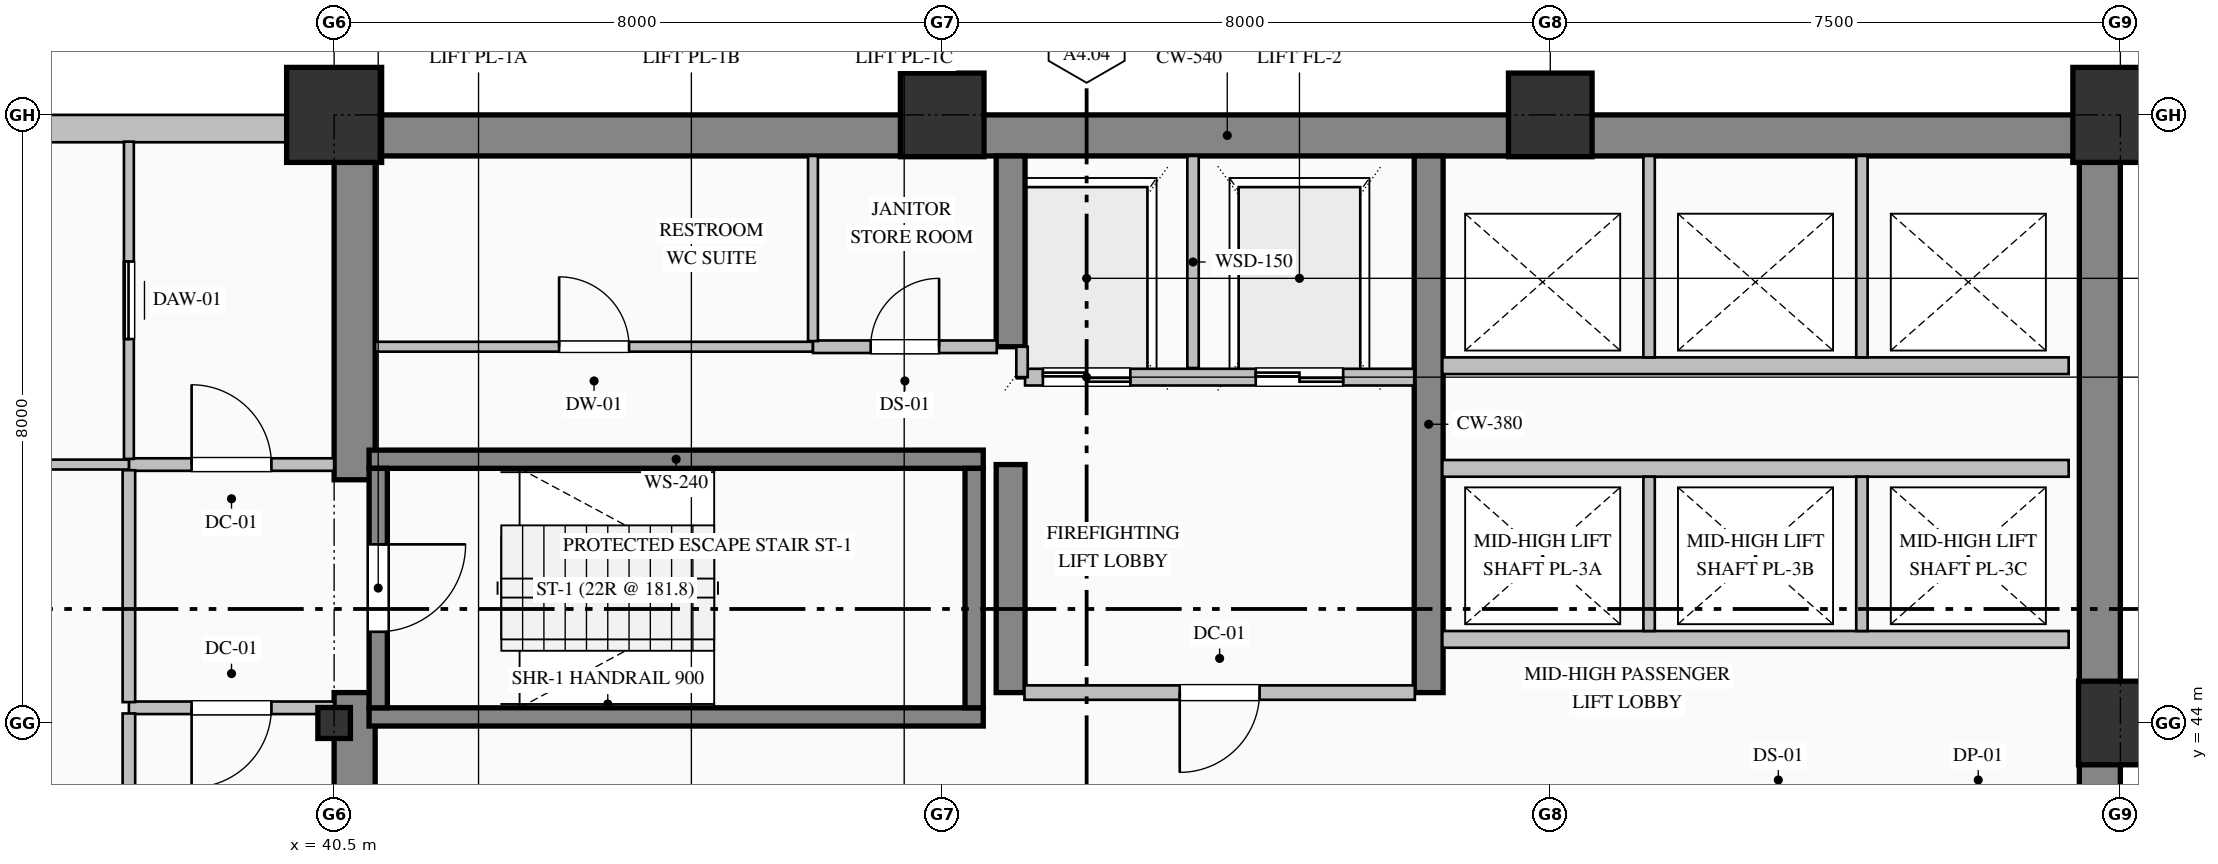
"""IFC4 building model, lengths in metres.
Left out: names, types, materials, properties, quantities, classifications, styles, units other than length and angle.
Written with IfcOpenShell. Run it as: python <this file> out.ifc"""

import sys

from ifc_helpers import new_model, si_unit, direction, frame, frame_2d, origin, origin_2d, place, context, subcontext, project, spatial, rectangle, hollow_rectangle, i_section, extrude, element, fill, save


model = new_model("IFC4")
c1 = context("Model", 3, precision=1e-05, world=origin(), true_north=direction((0.0, 1.0)))
c2 = subcontext(c1, "Body", "Model", "MODEL_VIEW")
j1 = project(units=[si_unit("LENGTHUNIT", "METRE"), si_unit("PLANEANGLEUNIT", "RADIAN")], contexts=[c1])
p1 = place(None, origin())
s1 = spatial("IfcSite", under=j1, at=p1, CompositionType="ELEMENT")
p2 = place(p1, origin())
s2 = spatial("IfcBuilding", under=s1, at=p2, CompositionType="ELEMENT")
p3 = place(p2, frame((0.0, 0.0, 76.2)))
s3 = spatial("IfcBuildingStorey", under=s2, at=p3, CompositionType="ELEMENT", Elevation=76.2)
p4 = place(p3, frame((40.5, 51.73, 0.0), z_axis=(0.0, 0.0, 1.0), x_axis=(1.0, 0.0, 0.0)))
e1 = element("IfcWall", 1, at=p4, inside=s3, PredefinedType="SHEAR", context=c2, shape_type="SweptSolid", body=[
    extrude(rectangle(XDim=23.5, YDim=0.54, at=frame_2d((11.75, 0.0))), origin(), (0.0, 0.0, 1.0), 3.75),
])
p5 = place(p3, frame((63.73, 36.32, 0.0), z_axis=(0.0, 0.0, 1.0), x_axis=(0.0, 1.0, 0.0)))
e2 = element("IfcWall", 2, at=p5, inside=s3, PredefinedType="SHEAR", context=c2, shape_type="SweptSolid", body=[
    extrude(rectangle(XDim=15.14, YDim=0.54, at=frame_2d((7.57, 0.0))), origin(), (0.0, 0.0, 1.0), 3.75),
])
p6 = place(p3, frame((40.77, 36.54, 0.0), z_axis=(0.0, 0.0, 1.0), x_axis=(0.0, 1.0, 0.0)))
e3 = element("IfcWall", 3, at=p6, inside=s3, PredefinedType="SHEAR", context=c2, shape_type="SweptSolid", body=[
    extrude(rectangle(XDim=7.86, YDim=0.54, at=frame_2d((3.93, 0.0))), origin(), (0.0, 0.0, 1.0), 3.75),
])
p7 = place(p3, frame((40.77, 47.2, 0.0), z_axis=(0.0, 0.0, 1.0), x_axis=(0.0, 1.0, 0.0)))
e4 = element("IfcWall", 4, at=p7, inside=s3, PredefinedType="SHEAR", context=c2, shape_type="SweptSolid", body=[
    extrude(rectangle(XDim=4.26, YDim=0.54, at=frame_2d((2.13, 0.0))), origin(), (0.0, 0.0, 1.0), 3.75),
])
p8 = place(p3, frame((49.4, 44.4, 0.0), z_axis=(0.0, 0.0, 1.0), x_axis=(0.0, 1.0, 0.0)))
e5 = element("IfcWall", 5, at=p8, inside=s3, PredefinedType="SHEAR", context=c2, shape_type="SweptSolid", body=[
    extrude(rectangle(XDim=3.0, YDim=0.38, at=frame_2d((1.5, 0.0))), origin(), (0.0, 0.0, 1.0), 3.75),
])
p9 = place(p3, frame((49.4, 48.95, 0.0), z_axis=(0.0, 0.0, 1.0), x_axis=(0.0, 1.0, 0.0)))
e6 = element("IfcWall", 6, at=p9, inside=s3, PredefinedType="SHEAR", context=c2, shape_type="SweptSolid", body=[
    extrude(rectangle(XDim=2.51, YDim=0.38, at=frame_2d((1.255, 0.0))), origin(), (0.0, 0.0, 1.0), 3.75),
])
p10 = place(p3, frame((54.9, 44.4, 0.0), z_axis=(0.0, 0.0, 1.0), x_axis=(0.0, 1.0, 0.0)))
e7 = element("IfcWall", 7, at=p10, inside=s3, PredefinedType="SHEAR", context=c2, shape_type="SweptSolid", body=[
    extrude(rectangle(XDim=7.06, YDim=0.38, at=frame_2d((3.53, 0.0))), origin(), (0.0, 0.0, 1.0), 3.75),
])
p11 = place(p3, frame((40.5, 44.0, 0.0), z_axis=(0.0, 0.0, 1.0), x_axis=(1.0, 0.0, 0.0)))
e8 = element("IfcColumn", 8, at=p11, inside=s3, PredefinedType="COLUMN", context=c2, shape_type="SweptSolid", body=[
    extrude(i_section(OverallWidth=0.407, OverallDepth=0.428, WebThickness=0.02, FlangeThickness=0.035, FilletRadius=0.022, at=origin_2d()), origin(), (0.0, 0.0, 1.0), 4.0),
])
p12 = place(p3, frame((40.5, 52.0, 0.0), z_axis=(0.0, 0.0, 1.0), x_axis=(1.0, 0.0, 0.0)))
e9 = element("IfcColumn", 9, at=p12, inside=s3, PredefinedType="COLUMN", context=c2, shape_type="SweptSolid", body=[
    extrude(hollow_rectangle(XDim=1.25, YDim=1.25, WallThickness=0.045, at=origin_2d()), origin(), (0.0, 0.0, 1.0), 4.0),
])
for number, where, z_axis, x_axis in (
    (10, (48.5, 52.0, 0.0), (0.0, 0.0, 1.0), (1.0, 0.0, 0.0)),
    (11, (56.5, 52.0, 0.0), (0.0, 0.0, 1.0), (1.0, 0.0, 0.0)),
    (12, (64.0, 44.0, 0.0), (0.0, 0.0, 1.0), (1.0, 0.0, 0.0)),
):
    element("IfcColumn", number, at=place(p3, frame(where, z_axis=z_axis, x_axis=x_axis)), inside=s3, PredefinedType="COLUMN", context=c2, shape_type="SweptSolid", body=[
        extrude(hollow_rectangle(XDim=1.1, YDim=1.1, WallThickness=0.04, at=origin_2d()), origin(), (0.0, 0.0, 1.0), 4.0),
    ])
p13 = place(p3, frame((64.0, 52.0, 0.0), z_axis=(0.0, 0.0, 1.0), x_axis=(1.0, 0.0, 0.0)))
e13 = element("IfcColumn", 13, at=p13, inside=s3, PredefinedType="COLUMN", context=c2, shape_type="SweptSolid", body=[
    extrude(hollow_rectangle(XDim=1.25, YDim=1.25, WallThickness=0.045, at=origin_2d()), origin(), (0.0, 0.0, 1.0), 4.0),
])
p14 = place(p3, frame((4.0, 51.82, 0.0), z_axis=(0.0, 0.0, 1.0), x_axis=(1.0, 0.0, 0.0)))
e14 = element("IfcWall", 14, at=p14, inside=s3, PredefinedType="SOLIDWALL", context=c2, shape_type="SweptSolid", body=[
    extrude(rectangle(XDim=36.52, YDim=0.36, at=frame_2d((18.26, 0.0))), origin(), (0.0, 0.0, 1.0), 3.25),
])
p15 = place(p14, frame((6.3, 0.0, 0.85)))
e15 = element("IfcOpeningElement", 15, at=p15, cuts=e14, PredefinedType="OPENING", context=c2, shape_type="SweptSolid", body=[
    extrude(rectangle(XDim=1.8, YDim=2.05, at=frame_2d((0.9, 1.025))), frame((0.0, 0.19, 0.0), z_axis=(0.0, -1.0, 0.0), x_axis=(1.0, 0.0, 0.0)), (0.0, 0.0, 1.0), 0.38),
])
p16 = place(p14, frame((17.1, 0.0, 0.85)))
e16 = element("IfcOpeningElement", 16, at=p16, cuts=e14, PredefinedType="OPENING", context=c2, shape_type="SweptSolid", body=[
    extrude(rectangle(XDim=1.8, YDim=2.05, at=frame_2d((0.9, 1.025))), frame((0.0, 0.19, 0.0), z_axis=(0.0, -1.0, 0.0), x_axis=(1.0, 0.0, 0.0)), (0.0, 0.0, 1.0), 0.38),
])
p17 = place(p14, frame((24.0, 0.0, 0.8)))
e17 = element("IfcOpeningElement", 17, at=p17, cuts=e14, PredefinedType="OPENING", context=c2, shape_type="SweptSolid", body=[
    extrude(rectangle(XDim=2.4, YDim=2.15, at=frame_2d((1.2, 1.075))), frame((0.0, 0.19, 0.0), z_axis=(0.0, -1.0, 0.0), x_axis=(1.0, 0.0, 0.0)), (0.0, 0.0, 1.0), 0.38),
])
for number, where, z_axis, x_axis in (
    (18, (40.96, 47.47, 0.0), (0.0, 0.0, 1.0), (1.0, 0.0, 0.0)),
    (19, (49.04, 44.08, 0.0), (0.0, 0.0, 1.0), (-1.0, 0.0, 0.0)),
):
    element("IfcWall", number, at=place(p3, frame(where, z_axis=z_axis, x_axis=x_axis)), inside=s3, PredefinedType="SOLIDWALL", context=c2, shape_type="SweptSolid", body=[
        extrude(rectangle(XDim=8.08, YDim=0.24, at=frame_2d((4.04, 0.0))), origin(), (0.0, 0.0, 1.0), 4.0),
    ])
p18 = place(p3, frame((41.08, 47.35, 0.0), z_axis=(0.0, 0.0, 1.0), x_axis=(0.0, -1.0, 0.0)))
e20 = element("IfcWall", 20, at=p18, inside=s3, PredefinedType="SOLIDWALL", context=c2, shape_type="SweptSolid", body=[
    extrude(rectangle(XDim=3.15, YDim=0.24, at=frame_2d((1.575, 0.0))), origin(), (0.0, 0.0, 1.0), 4.0),
])
p19 = place(p18, frame((1.0, 0.0, 0.0)))
e21 = element("IfcOpeningElement", 21, at=p19, cuts=e20, PredefinedType="OPENING", context=c2, shape_type="SweptSolid", body=[
    extrude(rectangle(XDim=1.15, YDim=2.2, at=frame_2d((0.575, 1.1))), frame((0.0, 0.13, 0.0), z_axis=(0.0, -1.0, 0.0), x_axis=(1.0, 0.0, 0.0)), (0.0, 0.0, 1.0), 0.26),
])
p20 = place(p3, frame((48.92, 44.2, 0.0), z_axis=(0.0, 0.0, 1.0), x_axis=(0.0, 1.0, 0.0)))
e22 = element("IfcWall", 22, at=p20, inside=s3, PredefinedType="SOLIDWALL", context=c2, shape_type="SweptSolid", body=[
    extrude(rectangle(XDim=3.15, YDim=0.24, at=frame_2d((1.575, 0.0))), origin(), (0.0, 0.0, 1.0), 4.0),
])
p21 = place(p3, frame((54.71, 48.55, 0.0), z_axis=(0.0, 0.0, 1.0), x_axis=(-1.0, 0.0, 0.0)))
e23 = element("IfcWall", 23, at=p21, inside=s3, PredefinedType="PARTITIONING", context=c2, shape_type="SweptSolid", body=[
    extrude(rectangle(XDim=5.12, YDim=0.22, at=frame_2d((2.56, 0.0))), origin(), (0.0, 0.0, 1.0), 3.75),
])
p22 = place(p21, frame((3.735, 0.0, 0.0)))
e24 = element("IfcOpeningElement", 24, at=p22, cuts=e23, PredefinedType="OPENING", context=c2, shape_type="SweptSolid", body=[
    extrude(rectangle(XDim=1.15, YDim=2.2, at=frame_2d((0.575, 1.1))), frame((0.0, 0.12, 0.0), z_axis=(0.0, -1.0, 0.0), x_axis=(1.0, 0.0, 0.0)), (0.0, 0.0, 1.0), 0.24),
])
p23 = place(p21, frame((0.935, 0.0, 0.0)))
e25 = element("IfcOpeningElement", 25, at=p23, cuts=e23, PredefinedType="OPENING", context=c2, shape_type="SweptSolid", body=[
    extrude(rectangle(XDim=1.15, YDim=2.2, at=frame_2d((0.575, 1.1))), frame((0.0, 0.12, 0.0), z_axis=(0.0, -1.0, 0.0), x_axis=(1.0, 0.0, 0.0)), (0.0, 0.0, 1.0), 0.24),
])
p24 = place(p3, frame((51.8, 48.67, 0.0), z_axis=(0.0, 0.0, 1.0), x_axis=(0.0, 1.0, 0.0)))
e26 = element("IfcWall", 26, at=p24, inside=s3, PredefinedType="PARTITIONING", context=c2, shape_type="SweptSolid", body=[
    extrude(rectangle(XDim=2.79, YDim=0.15, at=frame_2d((1.395, 0.0))), origin(), (0.0, 0.0, 1.0), 3.75),
])
p25 = place(p3, frame((49.55, 48.55, 0.0), z_axis=(0.0, 0.0, 1.0), x_axis=(0.0, 1.0, 0.0)))
e27 = element("IfcWall", 27, at=p25, inside=s3, PredefinedType="PARTITIONING", context=c2, shape_type="SweptSolid", body=[
    extrude(rectangle(XDim=0.4, YDim=0.15, at=frame_2d((0.2, 0.0))), origin(), (0.0, 0.0, 1.0), 3.75),
])
for number, where, z_axis, x_axis in (
    (28, (63.32, 45.1, 0.0), (0.0, 0.0, 1.0), (-1.0, 0.0, 0.0)),
    (29, (55.08, 47.35, 0.0), (0.0, 0.0, 1.0), (1.0, 0.0, 0.0)),
):
    element("IfcWall", number, at=place(p3, frame(where, z_axis=z_axis, x_axis=x_axis)), inside=s3, PredefinedType="PARTITIONING", context=c2, shape_type="SweptSolid", body=[
        extrude(rectangle(XDim=8.24, YDim=0.22, at=frame_2d((4.12, 0.0))), origin(), (0.0, 0.0, 1.0), 3.75),
    ])
for number, where, z_axis, x_axis in (
    (30, (57.8, 45.21, 0.0), (0.0, 0.0, 1.0), (0.0, 1.0, 0.0)),
    (31, (60.6, 45.21, 0.0), (0.0, 0.0, 1.0), (0.0, 1.0, 0.0)),
):
    element("IfcWall", number, at=place(p3, frame(where, z_axis=z_axis, x_axis=x_axis)), inside=s3, PredefinedType="PARTITIONING", context=c2, shape_type="SweptSolid", body=[
        extrude(rectangle(XDim=2.03, YDim=0.15, at=frame_2d((1.015, 0.0))), origin(), (0.0, 0.0, 1.0), 3.75),
    ])
p26 = place(p3, frame((63.32, 48.7, 0.0), z_axis=(0.0, 0.0, 1.0), x_axis=(-1.0, 0.0, 0.0)))
e32 = element("IfcWall", 32, at=p26, inside=s3, PredefinedType="PARTITIONING", context=c2, shape_type="SweptSolid", body=[
    extrude(rectangle(XDim=8.24, YDim=0.22, at=frame_2d((4.12, 0.0))), origin(), (0.0, 0.0, 1.0), 3.75),
])
for number, where, z_axis, x_axis in (
    (33, (57.8, 48.81, 0.0), (0.0, 0.0, 1.0), (0.0, 1.0, 0.0)),
    (34, (60.6, 48.81, 0.0), (0.0, 0.0, 1.0), (0.0, 1.0, 0.0)),
):
    element("IfcWall", number, at=place(p3, frame(where, z_axis=z_axis, x_axis=x_axis)), inside=s3, PredefinedType="PARTITIONING", context=c2, shape_type="SweptSolid", body=[
        extrude(rectangle(XDim=2.65, YDim=0.15, at=frame_2d((1.325, 0.0))), origin(), (0.0, 0.0, 1.0), 3.75),
    ])
p27 = place(p3, frame((37.8, 47.4, 0.0), z_axis=(0.0, 0.0, 1.0), x_axis=(1.0, 0.0, 0.0)))
e35 = element("IfcWall", 35, at=p27, inside=s3, PredefinedType="PARTITIONING", context=c2, shape_type="SweptSolid", body=[
    extrude(rectangle(XDim=2.7, YDim=0.165, at=frame_2d((1.35, 0.0))), origin(), (0.0, 0.0, 1.0), 3.75),
])
p28 = place(p27, frame((0.825, 0.0, 0.0)))
e36 = element("IfcOpeningElement", 36, at=p28, cuts=e35, PredefinedType="OPENING", context=c2, shape_type="SweptSolid", body=[
    extrude(rectangle(XDim=1.05, YDim=2.15, at=frame_2d((0.525, 1.075))), frame((0.0, 0.093, 0.0), z_axis=(0.0, -1.0, 0.0), x_axis=(1.0, 0.0, 0.0)), (0.0, 0.0, 1.0), 0.185),
])
p29 = place(p3, frame((40.5, 44.2, 0.0), z_axis=(0.0, 0.0, 1.0), x_axis=(-1.0, 0.0, 0.0)))
e37 = element("IfcWall", 37, at=p29, inside=s3, PredefinedType="PARTITIONING", context=c2, shape_type="SweptSolid", body=[
    extrude(rectangle(XDim=2.7, YDim=0.165, at=frame_2d((1.35, 0.0))), origin(), (0.0, 0.0, 1.0), 3.75),
])
p30 = place(p29, frame((0.825, 0.0, 0.0)))
e38 = element("IfcOpeningElement", 38, at=p30, cuts=e37, PredefinedType="OPENING", context=c2, shape_type="SweptSolid", body=[
    extrude(rectangle(XDim=1.05, YDim=2.15, at=frame_2d((0.525, 1.075))), frame((0.0, 0.093, 0.0), z_axis=(0.0, -1.0, 0.0), x_axis=(1.0, 0.0, 0.0)), (0.0, 0.0, 1.0), 0.185),
])
p31 = place(p3, frame((37.8, 44.274, 0.0), z_axis=(0.0, 0.0, 1.0), x_axis=(0.0, 1.0, 0.0)))
e39 = element("IfcWall", 39, at=p31, inside=s3, PredefinedType="PARTITIONING", context=c2, shape_type="SweptSolid", body=[
    extrude(rectangle(XDim=3.051, YDim=0.165, at=frame_2d((1.525, 0.0))), origin(), (0.0, 0.0, 1.0), 3.75),
])
p32 = place(p3, frame((37.8, 47.475, 0.0), z_axis=(0.0, 0.0, 1.0), x_axis=(0.0, 1.0, 0.0)))
e40 = element("IfcWall", 40, at=p32, inside=s3, PredefinedType="PARTITIONING", context=c2, shape_type="SweptSolid", body=[
    extrude(rectangle(XDim=4.173, YDim=0.13, at=frame_2d((2.087, 0.0))), origin(), (0.0, 0.0, 1.0), 3.75),
])
p33 = place(p32, frame((1.577, 0.0, 0.0)))
e41 = element("IfcOpeningElement", 41, at=p33, cuts=e40, PredefinedType="OPENING", context=c2, shape_type="SweptSolid", body=[
    extrude(rectangle(XDim=1.02, YDim=2.15, at=frame_2d((0.51, 1.075))), frame((0.0, 0.075, 0.0), z_axis=(0.0, -1.0, 0.0), x_axis=(1.0, 0.0, 0.0)), (0.0, 0.0, 1.0), 0.15),
])
p34 = place(p3, frame((37.8, 47.4, 0.0), z_axis=(0.0, 0.0, 1.0), x_axis=(-1.0, 0.0, 0.0)))
e42 = element("IfcWall", 42, at=p34, inside=s3, PredefinedType="PARTITIONING", context=c2, shape_type="SweptSolid", body=[
    extrude(rectangle(XDim=2.4, YDim=0.13, at=frame_2d((1.2, 0.0))), origin(), (0.0, 0.0, 1.0), 3.75),
])
p35 = place(p3, frame((41.04, 48.95, 0.0), z_axis=(0.0, 0.0, 1.0), x_axis=(1.0, 0.0, 0.0)))
e43 = element("IfcWall", 43, at=p35, inside=s3, PredefinedType="PARTITIONING", context=c2, shape_type="SweptSolid", body=[
    extrude(rectangle(XDim=5.76, YDim=0.13, at=frame_2d((2.88, 0.0))), origin(), (0.0, 0.0, 1.0), 3.75),
])
p36 = place(p35, frame((2.42, 0.0, 0.0)))
e44 = element("IfcOpeningElement", 44, at=p36, cuts=e43, PredefinedType="OPENING", context=c2, shape_type="SweptSolid", body=[
    extrude(rectangle(XDim=0.92, YDim=2.15, at=frame_2d((0.46, 1.075))), frame((0.0, 0.075, 0.0), z_axis=(0.0, -1.0, 0.0), x_axis=(1.0, 0.0, 0.0)), (0.0, 0.0, 1.0), 0.15),
])
p37 = place(p3, frame((46.8, 48.95, 0.0), z_axis=(0.0, 0.0, 1.0), x_axis=(1.0, 0.0, 0.0)))
e45 = element("IfcWall", 45, at=p37, inside=s3, PredefinedType="PARTITIONING", context=c2, shape_type="SweptSolid", body=[
    extrude(rectangle(XDim=2.418, YDim=0.165, at=frame_2d((1.209, 0.0))), origin(), (0.0, 0.0, 1.0), 3.75),
])
p38 = place(p37, frame((0.759, 0.0, 0.0)))
e46 = element("IfcOpeningElement", 46, at=p38, cuts=e45, PredefinedType="OPENING", context=c2, shape_type="SweptSolid", body=[
    extrude(rectangle(XDim=0.9, YDim=2.15, at=frame_2d((0.45, 1.075))), frame((0.0, 0.093, 0.0), z_axis=(0.0, -1.0, 0.0), x_axis=(1.0, 0.0, 0.0)), (0.0, 0.0, 1.0), 0.185),
])
p39 = place(p3, frame((54.718, 44.4, 0.0), z_axis=(0.0, 0.0, 1.0), x_axis=(-1.0, 0.0, 0.0)))
e47 = element("IfcWall", 47, at=p39, inside=s3, PredefinedType="PARTITIONING", context=c2, shape_type="SweptSolid", body=[
    extrude(rectangle(XDim=5.136, YDim=0.19, at=frame_2d((2.568, 0.0))), origin(), (0.0, 0.0, 1.0), 3.75),
])
p40 = place(p39, frame((2.043, 0.0, 0.0)))
e48 = element("IfcOpeningElement", 48, at=p40, cuts=e47, PredefinedType="OPENING", context=c2, shape_type="SweptSolid", body=[
    extrude(rectangle(XDim=1.05, YDim=2.15, at=frame_2d((0.525, 1.075))), frame((0.0, 0.105, 0.0), z_axis=(0.0, -1.0, 0.0), x_axis=(1.0, 0.0, 0.0)), (0.0, 0.0, 1.0), 0.21),
])
p41 = place(p3, frame((46.8, 51.46, 0.0), z_axis=(0.0, 0.0, 1.0), x_axis=(0.0, -1.0, 0.0)))
e49 = element("IfcWall", 49, at=p41, inside=s3, PredefinedType="PARTITIONING", context=c2, shape_type="SweptSolid", body=[
    extrude(rectangle(XDim=2.436, YDim=0.13, at=frame_2d((1.218, 0.0))), origin(), (0.0, 0.0, 1.0), 3.75),
])
p42 = place(p3, frame((37.8, 40.475, 0.0), z_axis=(0.0, 0.0, 1.0), x_axis=(0.0, 1.0, 0.0)))
e50 = element("IfcWall", 50, at=p42, inside=s3, PredefinedType="PARTITIONING", context=c2, shape_type="SweptSolid", body=[
    extrude(rectangle(XDim=3.651, YDim=0.165, at=frame_2d((1.825, 0.0))), origin(), (0.0, 0.0, 1.0), 3.75),
])
p43 = place(p19, origin())
e51 = element("IfcDoor", 51, at=p43, inside=s3, OperationType="SINGLE_SWING_LEFT", PredefinedType="DOOR", context=c2, shape_type="SweptSolid", body=[
    extrude(rectangle(XDim=1.15, YDim=2.2, at=frame_2d((0.575, 1.1))), frame((0.0, 0.025, 0.0), z_axis=(0.0, -1.0, 0.0), x_axis=(1.0, 0.0, 0.0)), (0.0, 0.0, 1.0), 0.05),
])
fill(e21, e51)
p44 = place(p22, origin())
e52 = element("IfcDoor", 52, at=p44, inside=s3, OperationType="DOUBLE_DOOR_SLIDING", PredefinedType="DOOR", context=c2, shape_type="SweptSolid", body=[
    extrude(rectangle(XDim=1.15, YDim=2.2, at=frame_2d((0.575, 1.1))), frame((0.0, 0.025, 0.0), z_axis=(0.0, -1.0, 0.0), x_axis=(1.0, 0.0, 0.0)), (0.0, 0.0, 1.0), 0.05),
])
fill(e24, e52)
p45 = place(p23, origin())
e53 = element("IfcDoor", 53, at=p45, inside=s3, OperationType="DOUBLE_DOOR_SLIDING", PredefinedType="DOOR", context=c2, shape_type="SweptSolid", body=[
    extrude(rectangle(XDim=1.15, YDim=2.2, at=frame_2d((0.575, 1.1))), frame((0.0, 0.025, 0.0), z_axis=(0.0, -1.0, 0.0), x_axis=(1.0, 0.0, 0.0)), (0.0, 0.0, 1.0), 0.05),
])
fill(e25, e53)
p46 = place(p40, origin())
e54 = element("IfcDoor", 54, at=p46, inside=s3, OperationType="SINGLE_SWING_RIGHT", PredefinedType="DOOR", context=c2, shape_type="SweptSolid", body=[
    extrude(rectangle(XDim=1.05, YDim=2.15, at=frame_2d((0.525, 1.075))), frame((0.0, 0.025, 0.0), z_axis=(0.0, -1.0, 0.0), x_axis=(1.0, 0.0, 0.0)), (0.0, 0.0, 1.0), 0.05),
])
fill(e48, e54)
p47 = place(p28, origin())
e55 = element("IfcDoor", 55, at=p47, inside=s3, OperationType="SINGLE_SWING_LEFT", PredefinedType="DOOR", context=c2, shape_type="SweptSolid", body=[
    extrude(rectangle(XDim=1.05, YDim=2.15, at=frame_2d((0.525, 1.075))), frame((0.0, 0.025, 0.0), z_axis=(0.0, -1.0, 0.0), x_axis=(1.0, 0.0, 0.0)), (0.0, 0.0, 1.0), 0.05),
])
fill(e36, e55)
p48 = place(p30, origin())
e56 = element("IfcDoor", 56, at=p48, inside=s3, OperationType="SINGLE_SWING_RIGHT", PredefinedType="DOOR", context=c2, shape_type="SweptSolid", body=[
    extrude(rectangle(XDim=1.05, YDim=2.15, at=frame_2d((0.525, 1.075))), frame((0.0, 0.025, 0.0), z_axis=(0.0, -1.0, 0.0), x_axis=(1.0, 0.0, 0.0)), (0.0, 0.0, 1.0), 0.05),
])
fill(e38, e56)
p49 = place(p33, origin())
e57 = element("IfcDoor", 57, at=p49, inside=s3, OperationType="SLIDING_TO_LEFT", PredefinedType="DOOR", context=c2, shape_type="SweptSolid", body=[
    extrude(rectangle(XDim=1.02, YDim=2.15, at=frame_2d((0.51, 1.075))), frame((0.0, 0.025, 0.0), z_axis=(0.0, -1.0, 0.0), x_axis=(1.0, 0.0, 0.0)), (0.0, 0.0, 1.0), 0.05),
])
fill(e41, e57)
p50 = place(p36, origin())
e58 = element("IfcDoor", 58, at=p50, inside=s3, OperationType="SINGLE_SWING_LEFT", PredefinedType="DOOR", context=c2, shape_type="SweptSolid", body=[
    extrude(rectangle(XDim=0.92, YDim=2.15, at=frame_2d((0.46, 1.075))), frame((0.0, 0.025, 0.0), z_axis=(0.0, -1.0, 0.0), x_axis=(1.0, 0.0, 0.0)), (0.0, 0.0, 1.0), 0.05),
])
fill(e44, e58)
p51 = place(p38, origin())
e59 = element("IfcDoor", 59, at=p51, inside=s3, OperationType="SINGLE_SWING_RIGHT", PredefinedType="DOOR", context=c2, shape_type="SweptSolid", body=[
    extrude(rectangle(XDim=0.9, YDim=2.15, at=frame_2d((0.45, 1.075))), frame((0.0, 0.025, 0.0), z_axis=(0.0, -1.0, 0.0), x_axis=(1.0, 0.0, 0.0)), (0.0, 0.0, 1.0), 0.05),
])
fill(e46, e59)
save(model, sys.argv[1])
